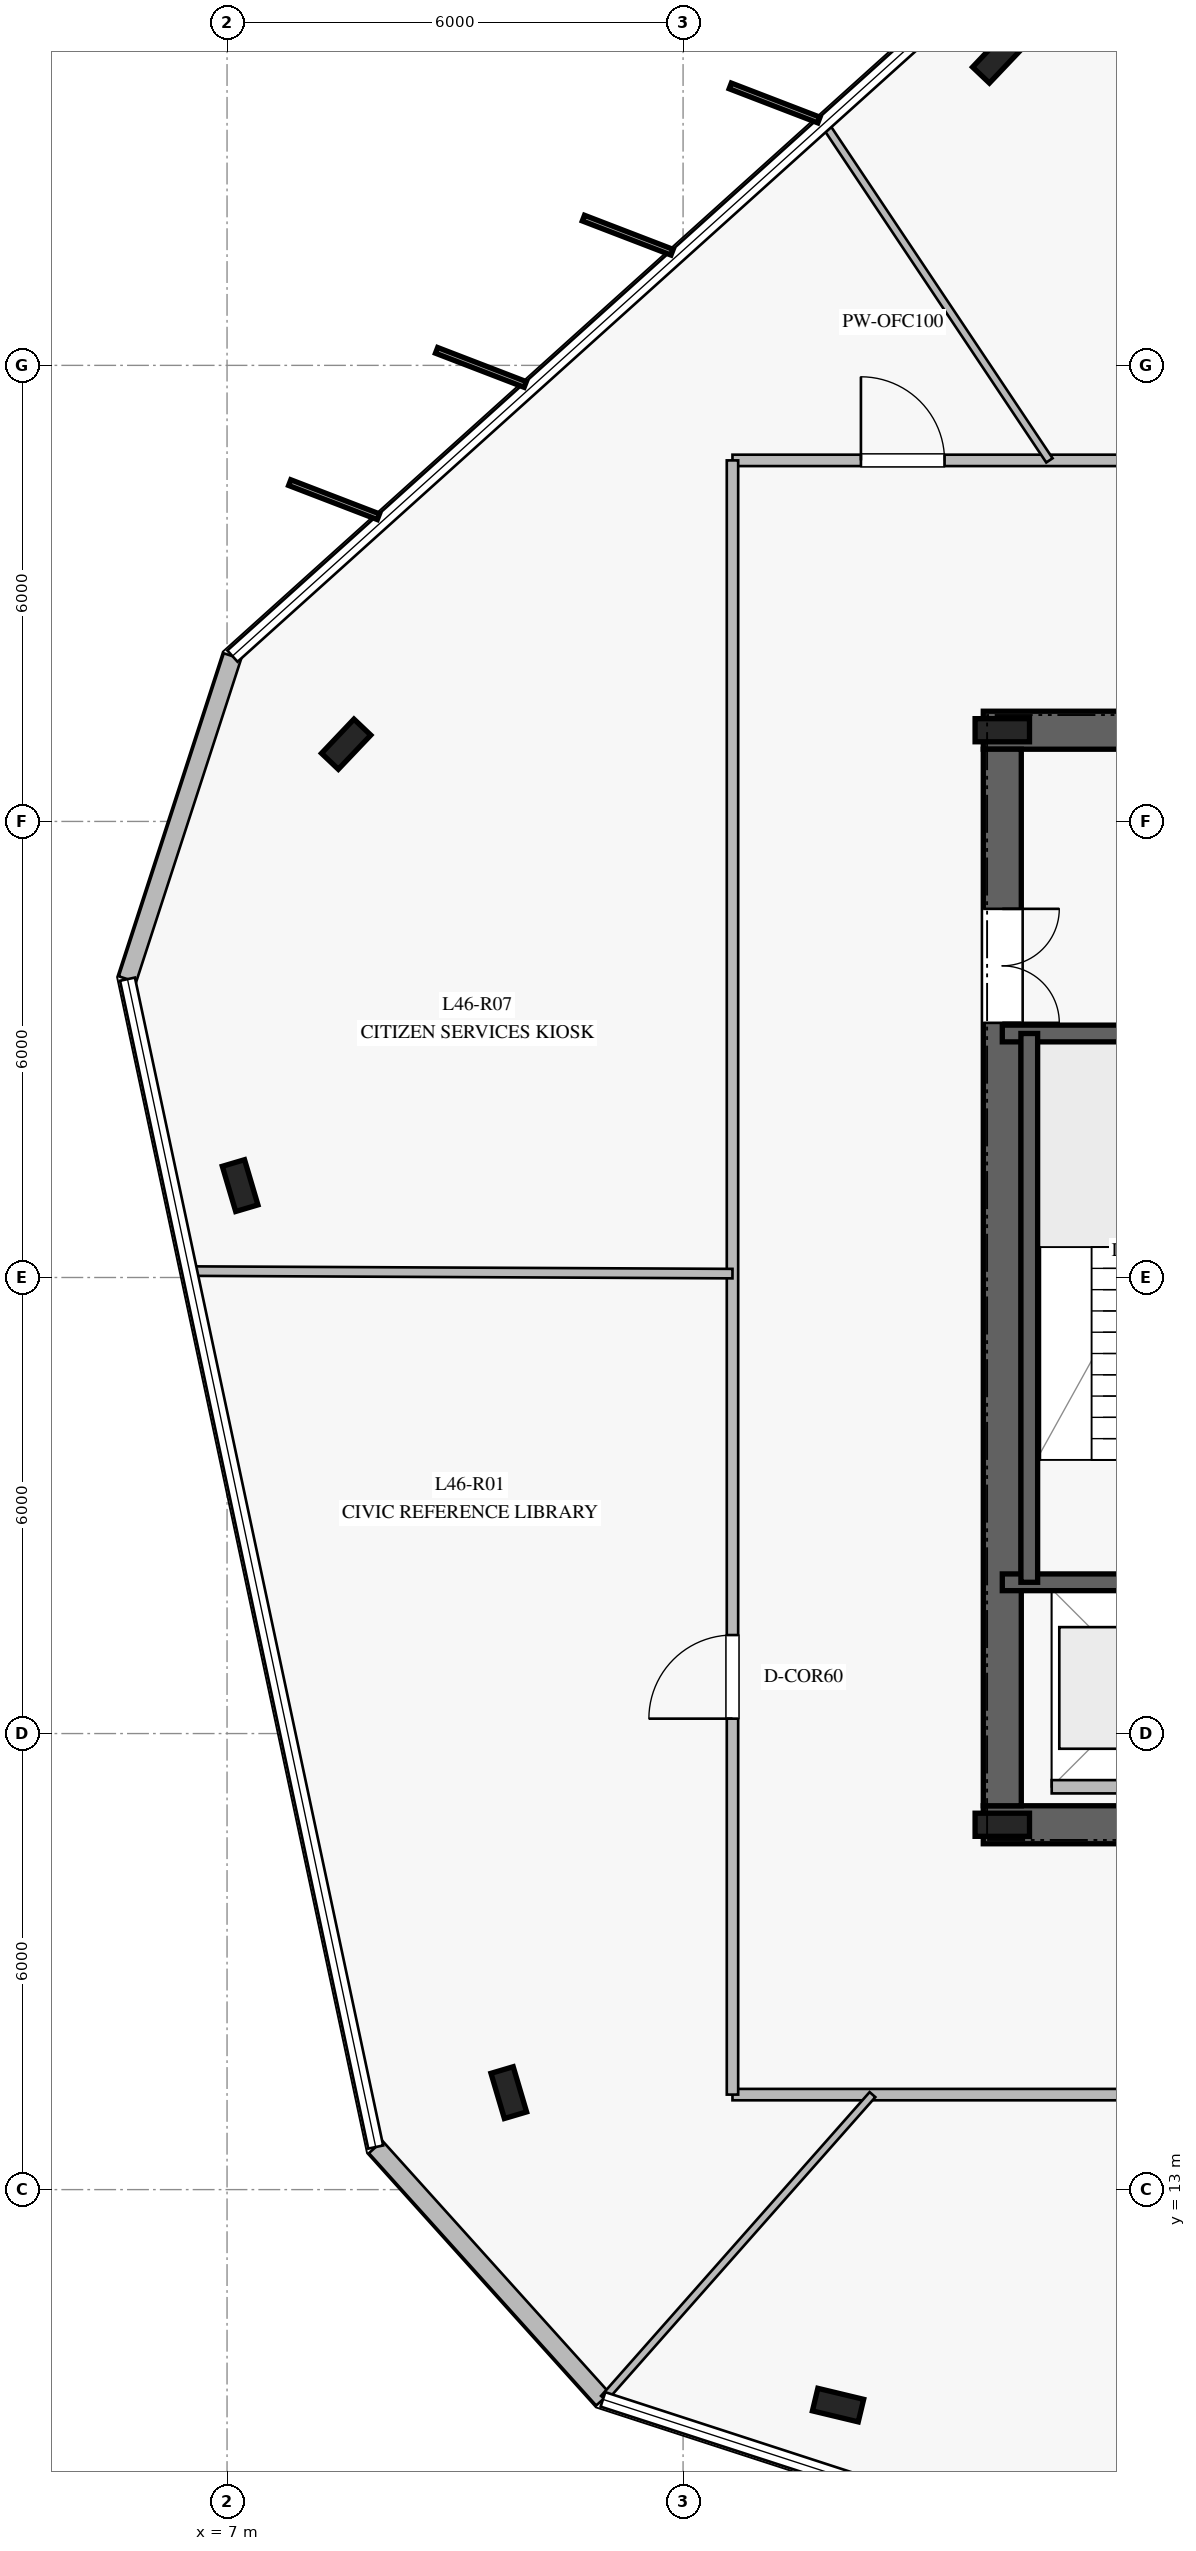
"""IFC4 building model, lengths in metres.
Left out: names, types, materials, properties, quantities, classifications, styles, units other than length and angle.
Written with IfcOpenShell. Run it as: python <this file> out.ifc"""

import sys

from ifc_helpers import new_model, si_unit, direction, frame, frame_2d, origin, origin_2d, place, context, subcontext, project, spatial, rectangle, i_section, extrude, element, fill, save


model = new_model("IFC4")
c1 = context("Model", 3, precision=1e-05, world=origin(), true_north=direction((0.0, 1.0)))
c2 = subcontext(c1, "Body", "Model", "MODEL_VIEW")
j1 = project(units=[si_unit("LENGTHUNIT", "METRE"), si_unit("PLANEANGLEUNIT", "RADIAN")], contexts=[c1])
p1 = place(None, origin())
s1 = spatial("IfcSite", under=j1, at=p1, CompositionType="ELEMENT")
p2 = place(p1, origin())
s2 = spatial("IfcBuilding", under=s1, at=p2, CompositionType="ELEMENT")
p3 = place(p2, frame((0.0, 0.0, 192.8)))
s3 = spatial("IfcBuildingStorey", under=s2, at=p3, CompositionType="ELEMENT", Elevation=192.8)
p4 = place(p3, frame((16.95, 17.8, 0.0), z_axis=(0.0, 0.0, 1.0), x_axis=(1.0, 0.0, 0.0)))
e1 = element("IfcWall", 1, at=p4, inside=s3, PredefinedType="SHEAR", context=c2, shape_type="SweptSolid", body=[
    extrude(rectangle(XDim=16.1, YDim=0.5, at=frame_2d((8.05, 0.0))), origin(), (0.0, 0.0, 1.0), 3.78),
])
p5 = place(p4, frame((5.0, 0.0, 0.0)))
e2 = element("IfcOpeningElement", 2, at=p5, cuts=e1, PredefinedType="OPENING", context=c2, shape_type="SweptSolid", body=[
    extrude(rectangle(XDim=1.2, YDim=2.25, at=frame_2d((0.6, 1.125))), frame((0.0, 0.26, 0.0), z_axis=(0.0, -1.0, 0.0), x_axis=(1.0, 0.0, 0.0)), (0.0, 0.0, 1.0), 0.52),
])
p6 = place(p4, frame((13.95, 0.0, 0.0)))
e3 = element("IfcOpeningElement", 3, at=p6, cuts=e1, PredefinedType="OPENING", context=c2, shape_type="SweptSolid", body=[
    extrude(rectangle(XDim=0.9, YDim=2.1, at=frame_2d((0.45, 1.05))), frame((0.0, 0.26, 0.0), z_axis=(0.0, -1.0, 0.0), x_axis=(1.0, 0.0, 0.0)), (0.0, 0.0, 1.0), 0.52),
])
p7 = place(p4, frame((9.2, 0.0, 0.0)))
e4 = element("IfcOpeningElement", 4, at=p7, cuts=e1, PredefinedType="OPENING", context=c2, shape_type="SweptSolid", body=[
    extrude(rectangle(XDim=1.1, YDim=2.2, at=frame_2d((0.55, 1.1))), frame((0.0, 0.26, 0.0), z_axis=(0.0, -1.0, 0.0), x_axis=(1.0, 0.0, 0.0)), (0.0, 0.0, 1.0), 0.52),
])
p8 = place(p3, frame((33.05, 32.2, 0.0), z_axis=(0.0, 0.0, 1.0), x_axis=(-1.0, 0.0, 0.0)))
e5 = element("IfcWall", 5, at=p8, inside=s3, PredefinedType="SHEAR", context=c2, shape_type="SweptSolid", body=[
    extrude(rectangle(XDim=16.1, YDim=0.5, at=frame_2d((8.05, 0.0))), origin(), (0.0, 0.0, 1.0), 3.78),
])
p9 = place(p8, frame((5.0, 0.0, 0.0)))
e6 = element("IfcOpeningElement", 6, at=p9, cuts=e5, PredefinedType="OPENING", context=c2, shape_type="SweptSolid", body=[
    extrude(rectangle(XDim=1.2, YDim=2.25, at=frame_2d((0.6, 1.125))), frame((0.0, 0.26, 0.0), z_axis=(0.0, -1.0, 0.0), x_axis=(1.0, 0.0, 0.0)), (0.0, 0.0, 1.0), 0.52),
])
p10 = place(p8, frame((9.825, 0.0, 0.0)))
e7 = element("IfcOpeningElement", 7, at=p10, cuts=e5, PredefinedType="OPENING", context=c2, shape_type="SweptSolid", body=[
    extrude(rectangle(XDim=1.1, YDim=2.2, at=frame_2d((0.55, 1.1))), frame((0.0, 0.26, 0.0), z_axis=(0.0, -1.0, 0.0), x_axis=(1.0, 0.0, 0.0)), (0.0, 0.0, 1.0), 0.52),
])
p11 = place(p3, frame((17.2, 31.95, 0.0), z_axis=(0.0, 0.0, 1.0), x_axis=(0.0, -1.0, 0.0)))
e8 = element("IfcWall", 8, at=p11, inside=s3, PredefinedType="SHEAR", context=c2, shape_type="SweptSolid", body=[
    extrude(rectangle(XDim=13.9, YDim=0.5, at=frame_2d((6.95, 0.0))), origin(), (0.0, 0.0, 1.0), 3.78),
])
p12 = place(p11, frame((2.1, 0.0, 0.0)))
e9 = element("IfcOpeningElement", 9, at=p12, cuts=e8, PredefinedType="OPENING", context=c2, shape_type="SweptSolid", body=[
    extrude(rectangle(XDim=1.5, YDim=2.2, at=frame_2d((0.75, 1.1))), frame((0.0, 0.26, 0.0), z_axis=(0.0, -1.0, 0.0), x_axis=(1.0, 0.0, 0.0)), (0.0, 0.0, 1.0), 0.52),
])
for number, where, z_axis, x_axis in (
    (10, (17.2, 17.8, 0.0), (0.0, 0.0, 1.0), (1.0, 0.0, 0.0)),
    (11, (17.2, 32.2, 0.0), (0.0, 0.0, 1.0), (1.0, 0.0, 0.0)),
):
    element("IfcColumn", number, at=place(p3, frame(where, z_axis=z_axis, x_axis=x_axis)), inside=s3, PredefinedType="COLUMN", context=c2, shape_type="SweptSolid", body=[
        extrude(i_section(OverallWidth=0.304, OverallDepth=0.716, WebThickness=0.021, FlangeThickness=0.04, at=origin_2d()), origin(), (0.0, 0.0, 1.0), 4.0),
    ])
for number, where, z_axis, x_axis in (
    (12, (17.2, 20.99, 0.0), (0.0, 0.0, 1.0), (1.0, 0.0, 0.0)),
    (13, (17.2, 28.21, 0.0), (0.0, 0.0, 1.0), (1.0, 0.0, 0.0)),
):
    element("IfcWall", number, at=place(p3, frame(where, z_axis=z_axis, x_axis=x_axis)), inside=s3, PredefinedType="SOLIDWALL", context=c2, shape_type="SweptSolid", body=[
        extrude(rectangle(XDim=3.72, YDim=0.22, at=frame_2d((1.86, 0.0))), origin(), (0.0, 0.0, 1.0), 3.78),
    ])
p13 = place(p3, frame((17.555, 28.21, 0.0), z_axis=(0.0, 0.0, 1.0), x_axis=(0.0, -1.0, 0.0)))
e14 = element("IfcWall", 14, at=p13, inside=s3, PredefinedType="SOLIDWALL", context=c2, shape_type="SweptSolid", body=[
    extrude(rectangle(XDim=7.22, YDim=0.22, at=frame_2d((3.61, 0.0))), origin(), (0.0, 0.0, 1.0), 3.78),
])
for number, where, z_axis, x_axis in (
    (15, (17.133, 41.044, 0.0), (0.0, 0.0, 1.0), (0.688, 0.725, 0.0)),
    (16, (8.567, 32.016, 0.0), (0.0, 0.0, 1.0), (0.688, 0.725, 0.0)),
    (17, (7.172, 26.209, 0.0), (0.0, 0.0, 1.0), (-0.284, 0.959, 0.0)),
    (18, (10.707, 14.276, 0.0), (0.0, 0.0, 1.0), (-0.284, 0.959, 0.0)),
    (19, (15.039, 10.165, 0.0), (0.0, 0.0, 1.0), (-0.972, 0.233, 0.0)),
):
    element("IfcColumn", number, at=place(p3, frame(where, z_axis=z_axis, x_axis=x_axis)), inside=s3, PredefinedType="COLUMN", context=c2, shape_type="SweptSolid", body=[
        extrude(i_section(OverallWidth=0.305, OverallDepth=0.62, WebThickness=0.021, FlangeThickness=0.04, at=origin_2d()), origin(), (0.0, 0.0, 1.0), 4.0),
    ])
p14 = place(p3, frame((7.071, 33.175, 0.0), z_axis=(0.0, 0.0, 1.0), x_axis=(-0.309056424215, -0.95104370386, 0.0)))
e20 = element("IfcWall", 20, at=p14, inside=s3, PredefinedType="STANDARD", context=c2, shape_type="SweptSolid", body=[
    extrude(rectangle(XDim=4.469, YDim=0.24, at=frame_2d((2.234, 0.0))), origin(), (0.0, 0.0, 1.0), 3.78),
])
p15 = place(p3, frame((8.956, 13.56, 0.0), z_axis=(0.0, 0.0, 1.0), x_axis=(0.669203190827, -0.74307946371, 0.0)))
e21 = element("IfcWall", 21, at=p15, inside=s3, PredefinedType="STANDARD", context=c2, shape_type="SweptSolid", body=[
    extrude(rectangle(XDim=4.468, YDim=0.24, at=frame_2d((2.234, 0.0))), origin(), (0.0, 0.0, 1.0), 3.78),
])
p16 = place(p3, frame((17.85, 18.3, 0.0), z_axis=(0.0, 0.0, 1.0), x_axis=(1.0, 0.0, 0.0)))
e22 = element("IfcWall", 22, at=p16, inside=s3, PredefinedType="PARTITIONING", context=c2, shape_type="SweptSolid", body=[
    extrude(rectangle(XDim=2.6, YDim=0.175, at=frame_2d((1.3, 0.0))), origin(), (0.0, 0.0, 1.0), 3.78),
])
p17 = place(p3, frame((13.65, 35.75, 0.0), z_axis=(0.0, 0.0, 1.0), x_axis=(1.0, 0.0, 0.0)))
e23 = element("IfcWall", 23, at=p17, inside=s3, PredefinedType="PARTITIONING", context=c2, shape_type="SweptSolid", body=[
    extrude(rectangle(XDim=22.7, YDim=0.15, at=frame_2d((11.35, 0.0))), origin(), (0.0, 0.0, 1.0), 3.05),
])
p18 = place(p17, frame((17.131, 0.0, 0.0)))
e24 = element("IfcOpeningElement", 24, at=p18, cuts=e23, PredefinedType="OPENING", context=c2, shape_type="SweptSolid", body=[
    extrude(rectangle(XDim=1.1, YDim=2.2, at=frame_2d((0.55, 1.1))), frame((0.0, 0.085, 0.0), z_axis=(0.0, -1.0, 0.0), x_axis=(1.0, 0.0, 0.0)), (0.0, 0.0, 1.0), 0.17),
])
p19 = place(p17, frame((8.023, 0.0, 0.0)))
e25 = element("IfcOpeningElement", 25, at=p19, cuts=e23, PredefinedType="OPENING", context=c2, shape_type="SweptSolid", body=[
    extrude(rectangle(XDim=1.1, YDim=2.2, at=frame_2d((0.55, 1.1))), frame((0.0, 0.085, 0.0), z_axis=(0.0, -1.0, 0.0), x_axis=(1.0, 0.0, 0.0)), (0.0, 0.0, 1.0), 0.17),
])
p20 = place(p17, frame((1.69, 0.0, 0.0)))
e26 = element("IfcOpeningElement", 26, at=p20, cuts=e23, PredefinedType="OPENING", context=c2, shape_type="SweptSolid", body=[
    extrude(rectangle(XDim=1.1, YDim=2.2, at=frame_2d((0.55, 1.1))), frame((0.0, 0.085, 0.0), z_axis=(0.0, -1.0, 0.0), x_axis=(1.0, 0.0, 0.0)), (0.0, 0.0, 1.0), 0.17),
])
p21 = place(p3, frame((36.35, 14.25, 0.0), z_axis=(0.0, 0.0, 1.0), x_axis=(-1.0, 0.0, 0.0)))
e27 = element("IfcWall", 27, at=p21, inside=s3, PredefinedType="PARTITIONING", context=c2, shape_type="SweptSolid", body=[
    extrude(rectangle(XDim=22.7, YDim=0.15, at=frame_2d((11.35, 0.0))), origin(), (0.0, 0.0, 1.0), 3.05),
])
p22 = place(p21, frame((13.784, 0.0, 0.0)))
e28 = element("IfcOpeningElement", 28, at=p22, cuts=e27, PredefinedType="OPENING", context=c2, shape_type="SweptSolid", body=[
    extrude(rectangle(XDim=1.1, YDim=2.2, at=frame_2d((0.55, 1.1))), frame((0.0, 0.085, 0.0), z_axis=(0.0, -1.0, 0.0), x_axis=(1.0, 0.0, 0.0)), (0.0, 0.0, 1.0), 0.17),
])
p23 = place(p3, frame((13.65, 14.25, 0.0), z_axis=(0.0, 0.0, 1.0), x_axis=(0.0, 1.0, 0.0)))
e29 = element("IfcWall", 29, at=p23, inside=s3, PredefinedType="PARTITIONING", context=c2, shape_type="SweptSolid", body=[
    extrude(rectangle(XDim=21.5, YDim=0.15, at=frame_2d((10.75, 0.0))), origin(), (0.0, 0.0, 1.0), 3.05),
])
p24 = place(p23, frame((4.946, 0.0, 0.0)))
e30 = element("IfcOpeningElement", 30, at=p24, cuts=e29, PredefinedType="OPENING", context=c2, shape_type="SweptSolid", body=[
    extrude(rectangle(XDim=1.1, YDim=2.2, at=frame_2d((0.55, 1.1))), frame((0.0, 0.085, 0.0), z_axis=(0.0, -1.0, 0.0), x_axis=(1.0, 0.0, 0.0)), (0.0, 0.0, 1.0), 0.17),
])
p25 = place(p3, frame((17.82, 35.75, 0.0), z_axis=(0.0, 0.0, 1.0), x_axis=(-0.555462961573, 0.831541278783, 0.0)))
e31 = element("IfcWall", 31, at=p25, inside=s3, PredefinedType="MOVABLE", context=c2, shape_type="SweptSolid", body=[
    extrude(rectangle(XDim=5.316, YDim=0.1, at=frame_2d((2.658, 0.0))), origin(), (0.0, 0.0, 1.0), 3.05),
])
p26 = place(p3, frame((13.65, 25.051, 0.0), z_axis=(0.0, 0.0, 1.0), x_axis=(-0.999989303988, 0.004625138963, 0.0)))
e32 = element("IfcWall", 32, at=p26, inside=s3, PredefinedType="PARTITIONING", context=c2, shape_type="SweptSolid", body=[
    extrude(rectangle(XDim=7.126, YDim=0.125, at=frame_2d((3.563, 0.0))), origin(), (0.0, 0.0, 1.0), 3.18),
])
p27 = place(p3, frame((15.492, 14.25, 0.0), z_axis=(0.0, 0.0, 1.0), x_axis=(-0.662370464817, -0.749176459412, 0.0)))
e33 = element("IfcWall", 33, at=p27, inside=s3, PredefinedType="MOVABLE", context=c2, shape_type="SweptSolid", body=[
    extrude(rectangle(XDim=5.335, YDim=0.1, at=frame_2d((2.667, 0.0))), origin(), (0.0, 0.0, 1.0), 3.18),
])
p28 = place(p12, origin())
e34 = element("IfcDoor", 34, at=p28, inside=s3, OperationType="DOUBLE_DOOR_SINGLE_SWING", PredefinedType="DOOR", context=c2, shape_type="SweptSolid", body=[
    extrude(rectangle(XDim=1.5, YDim=2.2, at=frame_2d((0.75, 1.1))), frame((0.0, 0.025, 0.0), z_axis=(0.0, -1.0, 0.0), x_axis=(1.0, 0.0, 0.0)), (0.0, 0.0, 1.0), 0.05),
])
fill(e9, e34)
p29 = place(p24, origin())
e35 = element("IfcDoor", 35, at=p29, inside=s3, OperationType="SINGLE_SWING_LEFT", PredefinedType="DOOR", context=c2, shape_type="SweptSolid", body=[
    extrude(rectangle(XDim=1.1, YDim=2.2, at=frame_2d((0.55, 1.1))), frame((0.0, 0.025, 0.0), z_axis=(0.0, -1.0, 0.0), x_axis=(1.0, 0.0, 0.0)), (0.0, 0.0, 1.0), 0.05),
])
fill(e30, e35)
p30 = place(p20, origin())
e36 = element("IfcDoor", 36, at=p30, inside=s3, OperationType="SINGLE_SWING_LEFT", PredefinedType="DOOR", context=c2, shape_type="SweptSolid", body=[
    extrude(rectangle(XDim=1.1, YDim=2.2, at=frame_2d((0.55, 1.1))), frame((0.0, 0.025, 0.0), z_axis=(0.0, -1.0, 0.0), x_axis=(1.0, 0.0, 0.0)), (0.0, 0.0, 1.0), 0.05),
])
fill(e26, e36)
save(model, sys.argv[1])
